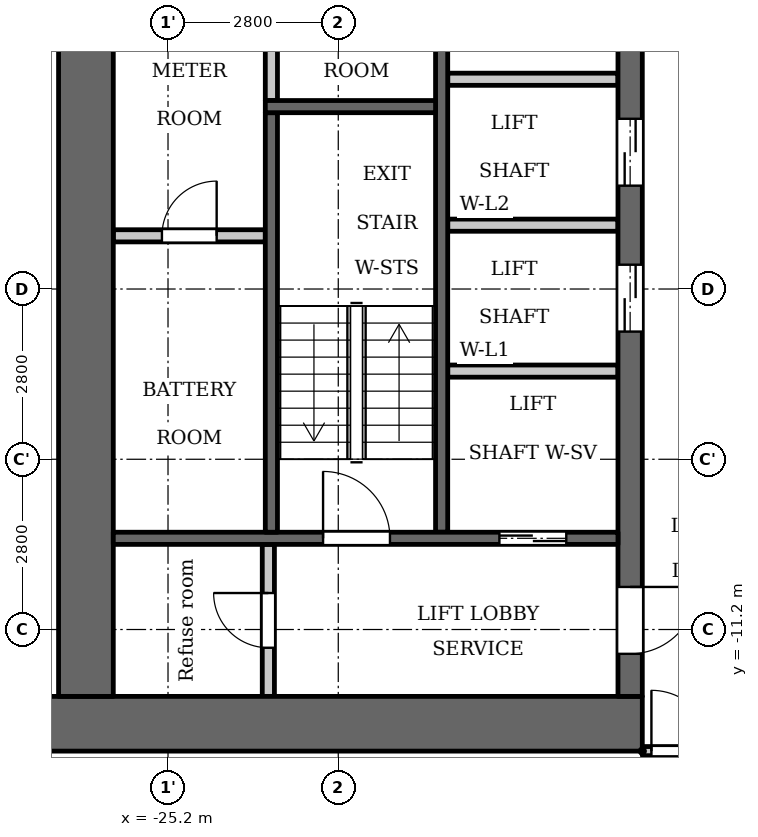
"""IFC4 building model, lengths in metres.
Left out: names, types, materials, properties, quantities, classifications, styles, units other than length and angle.
Written with IfcOpenShell. Run it as: python <this file> out.ifc"""

import sys

from ifc_helpers import new_model, si_unit, direction, frame, frame_2d, origin, place, context, subcontext, project, spatial, rectangle, extrude, element, fill, save


model = new_model("IFC4")
c1 = context("Model", 3, precision=1e-05, world=origin(), true_north=direction((0.0, 1.0)))
c2 = subcontext(c1, "Body", "Model", "MODEL_VIEW")
j1 = project(units=[si_unit("LENGTHUNIT", "METRE"), si_unit("PLANEANGLEUNIT", "RADIAN")], contexts=[c1])
p1 = place(None, origin())
s1 = spatial("IfcSite", under=j1, at=p1, CompositionType="ELEMENT")
p2 = place(p1, origin())
s2 = spatial("IfcBuilding", under=s1, at=p2, CompositionType="ELEMENT")
p3 = place(p2, frame((0.0, 0.0, 118.3)))
s3 = spatial("IfcBuildingStorey", under=s2, at=p3, CompositionType="ELEMENT", Elevation=118.3)
p4 = place(p3, frame((-23.5, -2.5, 0.0), z_axis=(0.0, 0.0, 1.0), x_axis=(0.0, 1.0, 0.0)))
e1 = element("IfcWall", 1, at=p4, inside=s3, PredefinedType="PARTITIONING", context=c2, shape_type="SweptSolid", body=[
    extrude(rectangle(XDim=2.65, YDim=0.2, at=frame_2d((1.325, 0.0))), origin(), (0.0, 0.0, 1.0), 3.2),
])
p5 = place(p3, frame((-20.7, -9.6, 0.0), z_axis=(0.0, 0.0, 1.0), x_axis=(0.0, 1.0, 0.0)))
e2 = element("IfcWall", 2, at=p5, inside=s3, PredefinedType="SHEAR", context=c2, shape_type="SweptSolid", body=[
    extrude(rectangle(XDim=9.75, YDim=0.2, at=frame_2d((4.875, 0.0))), origin(), (0.0, 0.0, 1.0), 3.2),
])
p6 = place(p3, frame((-17.4, -12.75, 0.0), z_axis=(0.0, 0.0, 1.0), x_axis=(-1.0, 0.0, 0.0)))
e3 = element("IfcWall", 3, at=p6, inside=s3, PredefinedType="SHEAR", context=c2, shape_type="SweptSolid", body=[
    extrude(rectangle(XDim=10.4, YDim=0.9, at=frame_2d((5.2, 0.0))), origin(), (0.0, 0.0, 1.0), 3.2),
])
p7 = place(p3, frame((-17.6, -12.3, 0.0), z_axis=(0.0, 0.0, 1.0), x_axis=(0.0, 1.0, 0.0)))
e4 = element("IfcWall", 4, at=p7, inside=s3, PredefinedType="SHEAR", context=c2, shape_type="SweptSolid", body=[
    extrude(rectangle(XDim=24.6, YDim=0.4, at=frame_2d((12.3, 0.0))), origin(), (0.0, 0.0, 1.0), 3.2),
])
p8 = place(p7, frame((6.0, 0.0, 0.0)))
e5 = element("IfcOpeningElement", 5, at=p8, cuts=e4, PredefinedType="OPENING", context=c2, shape_type="SweptSolid", body=[
    extrude(rectangle(XDim=1.1, YDim=2.1, at=frame_2d((0.55, 1.05))), frame((0.0, 0.21, 0.0), z_axis=(0.0, -1.0, 0.0), x_axis=(1.0, 0.0, 0.0)), (0.0, 0.0, 1.0), 0.42),
])
p9 = place(p7, frame((8.4, 0.0, 0.0)))
e6 = element("IfcOpeningElement", 6, at=p9, cuts=e4, PredefinedType="OPENING", context=c2, shape_type="SweptSolid", body=[
    extrude(rectangle(XDim=1.1, YDim=2.1, at=frame_2d((0.55, 1.05))), frame((0.0, 0.21, 0.0), z_axis=(0.0, -1.0, 0.0), x_axis=(1.0, 0.0, 0.0)), (0.0, 0.0, 1.0), 0.42),
])
p10 = place(p7, frame((10.8, 0.0, 0.0)))
e7 = element("IfcOpeningElement", 7, at=p10, cuts=e4, PredefinedType="OPENING", context=c2, shape_type="SweptSolid", body=[
    extrude(rectangle(XDim=1.1, YDim=2.1, at=frame_2d((0.55, 1.05))), frame((0.0, 0.21, 0.0), z_axis=(0.0, -1.0, 0.0), x_axis=(1.0, 0.0, 0.0)), (0.0, 0.0, 1.0), 0.42),
])
p11 = place(p7, frame((16.75, 0.0, 0.0)))
e8 = element("IfcOpeningElement", 8, at=p11, cuts=e4, PredefinedType="OPENING", context=c2, shape_type="SweptSolid", body=[
    extrude(rectangle(XDim=0.9, YDim=2.1, at=frame_2d((0.45, 1.05))), frame((0.0, 0.21, 0.0), z_axis=(0.0, -1.0, 0.0), x_axis=(1.0, 0.0, 0.0)), (0.0, 0.0, 1.0), 0.42),
])
p12 = place(p7, frame((22.8, 0.0, 0.0)))
e9 = element("IfcOpeningElement", 9, at=p12, cuts=e4, PredefinedType="OPENING", context=c2, shape_type="SweptSolid", body=[
    extrude(rectangle(XDim=1.1, YDim=2.1, at=frame_2d((0.55, 1.05))), frame((0.0, 0.21, 0.0), z_axis=(0.0, -1.0, 0.0), x_axis=(1.0, 0.0, 0.0)), (0.0, 0.0, 1.0), 0.42),
])
p13 = place(p7, frame((0.7, 0.0, 0.0)))
e10 = element("IfcOpeningElement", 10, at=p13, cuts=e4, PredefinedType="OPENING", context=c2, shape_type="SweptSolid", body=[
    extrude(rectangle(XDim=1.1, YDim=2.1, at=frame_2d((0.55, 1.05))), frame((0.0, 0.21, 0.0), z_axis=(0.0, -1.0, 0.0), x_axis=(1.0, 0.0, 0.0)), (0.0, 0.0, 1.0), 0.42),
])
p14 = place(p7, frame((12.775, 0.0, 0.0)))
e11 = element("IfcOpeningElement", 11, at=p14, cuts=e4, PredefinedType="OPENING", context=c2, shape_type="SweptSolid", body=[
    extrude(rectangle(XDim=1.8, YDim=2.1, at=frame_2d((0.9, 1.05))), frame((0.0, 0.21, 0.0), z_axis=(0.0, -1.0, 0.0), x_axis=(1.0, 0.0, 0.0)), (0.0, 0.0, 1.0), 0.42),
])
p15 = place(p3, frame((-26.55, -12.3, 0.0), z_axis=(0.0, 0.0, 1.0), x_axis=(0.0, 1.0, 0.0)))
e12 = element("IfcWall", 12, at=p15, inside=s3, PredefinedType="SHEAR", context=c2, shape_type="SweptSolid", body=[
    extrude(rectangle(XDim=24.6, YDim=0.9, at=frame_2d((12.3, 0.0))), origin(), (0.0, 0.0, 1.0), 3.2),
])
p16 = place(p3, frame((-23.55, -12.3, 0.0), z_axis=(0.0, 0.0, 1.0), x_axis=(0.0, 1.0, 0.0)))
e13 = element("IfcWall", 13, at=p16, inside=s3, PredefinedType="PARTITIONING", context=c2, shape_type="SweptSolid", body=[
    extrude(rectangle(XDim=2.5, YDim=0.2, at=frame_2d((1.25, 0.0))), origin(), (0.0, 0.0, 1.0), 3.2),
])
p17 = place(p16, frame((0.8, 0.0, 0.0)))
e14 = element("IfcOpeningElement", 14, at=p17, cuts=e13, PredefinedType="OPENING", context=c2, shape_type="SweptSolid", body=[
    extrude(rectangle(XDim=0.9, YDim=2.1, at=frame_2d((0.45, 1.05))), frame((0.0, 0.11, 0.0), z_axis=(0.0, -1.0, 0.0), x_axis=(1.0, 0.0, 0.0)), (0.0, 0.0, 1.0), 0.22),
])
p18 = place(p3, frame((-23.6, -4.725, 0.0), z_axis=(0.0, 0.0, 1.0), x_axis=(-1.0, 0.0, 0.0)))
e15 = element("IfcWall", 15, at=p18, inside=s3, PredefinedType="PARTITIONING", context=c2, shape_type="SweptSolid", body=[
    extrude(rectangle(XDim=2.5, YDim=0.2, at=frame_2d((1.25, 0.0))), origin(), (0.0, 0.0, 1.0), 3.2),
])
p19 = place(p18, frame((0.8, 0.0, 0.0)))
e16 = element("IfcOpeningElement", 16, at=p19, cuts=e15, PredefinedType="OPENING", context=c2, shape_type="SweptSolid", body=[
    extrude(rectangle(XDim=0.9, YDim=2.1, at=frame_2d((0.45, 1.05))), frame((0.0, 0.11, 0.0), z_axis=(0.0, -1.0, 0.0), x_axis=(1.0, 0.0, 0.0)), (0.0, 0.0, 1.0), 0.22),
])
p20 = place(p3, frame((-17.8, -9.7, 0.0), z_axis=(0.0, 0.0, 1.0), x_axis=(-1.0, 0.0, 0.0)))
e17 = element("IfcWall", 17, at=p20, inside=s3, PredefinedType="SHEAR", context=c2, shape_type="SweptSolid", body=[
    extrude(rectangle(XDim=8.3, YDim=0.2, at=frame_2d((4.15, 0.0))), origin(), (0.0, 0.0, 1.0), 3.2),
])
p21 = place(p20, frame((0.85, 0.0, 0.0)))
e18 = element("IfcOpeningElement", 18, at=p21, cuts=e17, PredefinedType="OPENING", context=c2, shape_type="SweptSolid", body=[
    extrude(rectangle(XDim=1.1, YDim=2.1, at=frame_2d((0.55, 1.05))), frame((0.0, 0.11, 0.0), z_axis=(0.0, -1.0, 0.0), x_axis=(1.0, 0.0, 0.0)), (0.0, 0.0, 1.0), 0.22),
])
p22 = place(p20, frame((3.75, 0.0, 0.0)))
e19 = element("IfcOpeningElement", 19, at=p22, cuts=e17, PredefinedType="OPENING", context=c2, shape_type="SweptSolid", body=[
    extrude(rectangle(XDim=1.1, YDim=2.1, at=frame_2d((0.55, 1.05))), frame((0.0, 0.11, 0.0), z_axis=(0.0, -1.0, 0.0), x_axis=(1.0, 0.0, 0.0)), (0.0, 0.0, 1.0), 0.22),
])
for number, where, z_axis, x_axis in (
    (20, (-17.8, -6.95, 0.0), (0.0, 0.0, 1.0), (-1.0, 0.0, 0.0)),
    (21, (-17.8, -4.55, 0.0), (0.0, 0.0, 1.0), (-1.0, 0.0, 0.0)),
    (22, (-17.8, -2.15, 0.0), (0.0, 0.0, 1.0), (-1.0, 0.0, 0.0)),
):
    element("IfcWall", number, at=place(p3, frame(where, z_axis=z_axis, x_axis=x_axis)), inside=s3, PredefinedType="PARTITIONING", context=c2, shape_type="SweptSolid", body=[
        extrude(rectangle(XDim=2.8, YDim=0.2, at=frame_2d((1.4, 0.0))), origin(), (0.0, 0.0, 1.0), 3.2),
    ])
p23 = place(p3, frame((-23.5, -9.6, 0.0), z_axis=(0.0, 0.0, 1.0), x_axis=(0.0, 1.0, 0.0)))
e23 = element("IfcWall", 23, at=p23, inside=s3, PredefinedType="SHEAR", context=c2, shape_type="SweptSolid", body=[
    extrude(rectangle(XDim=6.9, YDim=0.2, at=frame_2d((3.45, 0.0))), origin(), (0.0, 0.0, 1.0), 3.2),
])
p24 = place(p3, frame((-20.8, -2.6, 0.0), z_axis=(0.0, 0.0, 1.0), x_axis=(-1.0, 0.0, 0.0)))
e24 = element("IfcWall", 24, at=p24, inside=s3, PredefinedType="SHEAR", context=c2, shape_type="SweptSolid", body=[
    extrude(rectangle(XDim=2.8, YDim=0.2, at=frame_2d((1.4, 0.0))), origin(), (0.0, 0.0, 1.0), 3.2),
])
p25 = place(p3, frame((-17.4, -13.2, 0.0), z_axis=(0.0, 0.0, 1.0), x_axis=(1.0, 0.0, 0.0)))
e25 = element("IfcWall", 25, at=p25, inside=s3, PredefinedType="PARTITIONING", context=c2, shape_type="SweptSolid", body=[
    extrude(rectangle(XDim=34.8, YDim=0.15, at=frame_2d((17.4, 0.0))), origin(), (0.0, 0.0, 1.0), 3.2),
])
p26 = place(p25, frame((0.15, 0.0, 0.0)))
e26 = element("IfcOpeningElement", 26, at=p26, cuts=e25, PredefinedType="OPENING", context=c2, shape_type="SweptSolid", body=[
    extrude(rectangle(XDim=1.0, YDim=2.1, at=frame_2d((0.5, 1.05))), frame((0.0, 0.085, 0.0), z_axis=(0.0, -1.0, 0.0), x_axis=(1.0, 0.0, 0.0)), (0.0, 0.0, 1.0), 0.17),
])
p27 = place(p25, frame((33.55, 0.0, 0.0)))
e27 = element("IfcOpeningElement", 27, at=p27, cuts=e25, PredefinedType="OPENING", context=c2, shape_type="SweptSolid", body=[
    extrude(rectangle(XDim=1.0, YDim=2.1, at=frame_2d((0.5, 1.05))), frame((0.0, 0.085, 0.0), z_axis=(0.0, -1.0, 0.0), x_axis=(1.0, 0.0, 0.0)), (0.0, 0.0, 1.0), 0.17),
])
p28 = place(p25, frame((10.1, 0.0, 0.0)))
e28 = element("IfcOpeningElement", 28, at=p28, cuts=e25, PredefinedType="OPENING", context=c2, shape_type="SweptSolid", body=[
    extrude(rectangle(XDim=1.0, YDim=2.1, at=frame_2d((0.5, 1.05))), frame((0.0, 0.085, 0.0), z_axis=(0.0, -1.0, 0.0), x_axis=(1.0, 0.0, 0.0)), (0.0, 0.0, 1.0), 0.17),
])
p29 = place(p25, frame((15.7, 0.0, 0.0)))
e29 = element("IfcOpeningElement", 29, at=p29, cuts=e25, PredefinedType="OPENING", context=c2, shape_type="SweptSolid", body=[
    extrude(rectangle(XDim=1.0, YDim=2.1, at=frame_2d((0.5, 1.05))), frame((0.0, 0.085, 0.0), z_axis=(0.0, -1.0, 0.0), x_axis=(1.0, 0.0, 0.0)), (0.0, 0.0, 1.0), 0.17),
])
p30 = place(p25, frame((24.9, 0.0, 0.0)))
e30 = element("IfcOpeningElement", 30, at=p30, cuts=e25, PredefinedType="OPENING", context=c2, shape_type="SweptSolid", body=[
    extrude(rectangle(XDim=1.0, YDim=2.1, at=frame_2d((0.5, 1.05))), frame((0.0, 0.085, 0.0), z_axis=(0.0, -1.0, 0.0), x_axis=(1.0, 0.0, 0.0)), (0.0, 0.0, 1.0), 0.17),
])
p31 = place(p21, origin())
e31 = element("IfcDoor", 31, at=p31, inside=s3, OperationType="DOUBLE_DOOR_SLIDING", PredefinedType="DOOR", context=c2, shape_type="SweptSolid", body=[
    extrude(rectangle(XDim=1.1, YDim=2.1, at=frame_2d((0.55, 1.05))), frame((0.0, 0.025, 0.0), z_axis=(0.0, -1.0, 0.0), x_axis=(1.0, 0.0, 0.0)), (0.0, 0.0, 1.0), 0.05),
])
fill(e18, e31)
p32 = place(p8, origin())
e32 = element("IfcDoor", 32, at=p32, inside=s3, OperationType="DOUBLE_DOOR_SLIDING", PredefinedType="DOOR", context=c2, shape_type="SweptSolid", body=[
    extrude(rectangle(XDim=1.1, YDim=2.1, at=frame_2d((0.55, 1.05))), frame((0.0, 0.025, 0.0), z_axis=(0.0, -1.0, 0.0), x_axis=(1.0, 0.0, 0.0)), (0.0, 0.0, 1.0), 0.05),
])
fill(e5, e32)
p33 = place(p9, origin())
e33 = element("IfcDoor", 33, at=p33, inside=s3, OperationType="DOUBLE_DOOR_SLIDING", PredefinedType="DOOR", context=c2, shape_type="SweptSolid", body=[
    extrude(rectangle(XDim=1.1, YDim=2.1, at=frame_2d((0.55, 1.05))), frame((0.0, 0.025, 0.0), z_axis=(0.0, -1.0, 0.0), x_axis=(1.0, 0.0, 0.0)), (0.0, 0.0, 1.0), 0.05),
])
fill(e6, e33)
p34 = place(p13, origin())
e34 = element("IfcDoor", 34, at=p34, inside=s3, OperationType="SINGLE_SWING_RIGHT", PredefinedType="DOOR", context=c2, shape_type="SweptSolid", body=[
    extrude(rectangle(XDim=1.1, YDim=2.1, at=frame_2d((0.55, 1.05))), frame((0.0, 0.025, 0.0), z_axis=(0.0, -1.0, 0.0), x_axis=(1.0, 0.0, 0.0)), (0.0, 0.0, 1.0), 0.05),
])
fill(e10, e34)
p35 = place(p17, origin())
e35 = element("IfcDoor", 35, at=p35, inside=s3, OperationType="SINGLE_SWING_LEFT", PredefinedType="DOOR", context=c2, shape_type="SweptSolid", body=[
    extrude(rectangle(XDim=0.9, YDim=2.1, at=frame_2d((0.45, 1.05))), frame((0.0, 0.025, 0.0), z_axis=(0.0, -1.0, 0.0), x_axis=(1.0, 0.0, 0.0)), (0.0, 0.0, 1.0), 0.05),
])
fill(e14, e35)
p36 = place(p22, origin())
e36 = element("IfcDoor", 36, at=p36, inside=s3, OperationType="SINGLE_SWING_RIGHT", PredefinedType="DOOR", context=c2, shape_type="SweptSolid", body=[
    extrude(rectangle(XDim=1.1, YDim=2.1, at=frame_2d((0.55, 1.05))), frame((0.0, 0.025, 0.0), z_axis=(0.0, -1.0, 0.0), x_axis=(1.0, 0.0, 0.0)), (0.0, 0.0, 1.0), 0.05),
])
fill(e19, e36)
p37 = place(p19, origin())
e37 = element("IfcDoor", 37, at=p37, inside=s3, OperationType="SINGLE_SWING_LEFT", PredefinedType="DOOR", context=c2, shape_type="SweptSolid", body=[
    extrude(rectangle(XDim=0.9, YDim=2.1, at=frame_2d((0.45, 1.05))), frame((0.0, 0.025, 0.0), z_axis=(0.0, -1.0, 0.0), x_axis=(1.0, 0.0, 0.0)), (0.0, 0.0, 1.0), 0.05),
])
fill(e16, e37)
p38 = place(p26, origin())
e38 = element("IfcDoor", 38, at=p38, inside=s3, OperationType="SINGLE_SWING_RIGHT", PredefinedType="DOOR", context=c2, shape_type="SweptSolid", body=[
    extrude(rectangle(XDim=1.0, YDim=2.1, at=frame_2d((0.5, 1.05))), frame((0.0, 0.025, 0.0), z_axis=(0.0, -1.0, 0.0), x_axis=(1.0, 0.0, 0.0)), (0.0, 0.0, 1.0), 0.05),
])
fill(e26, e38)
save(model, sys.argv[1])
